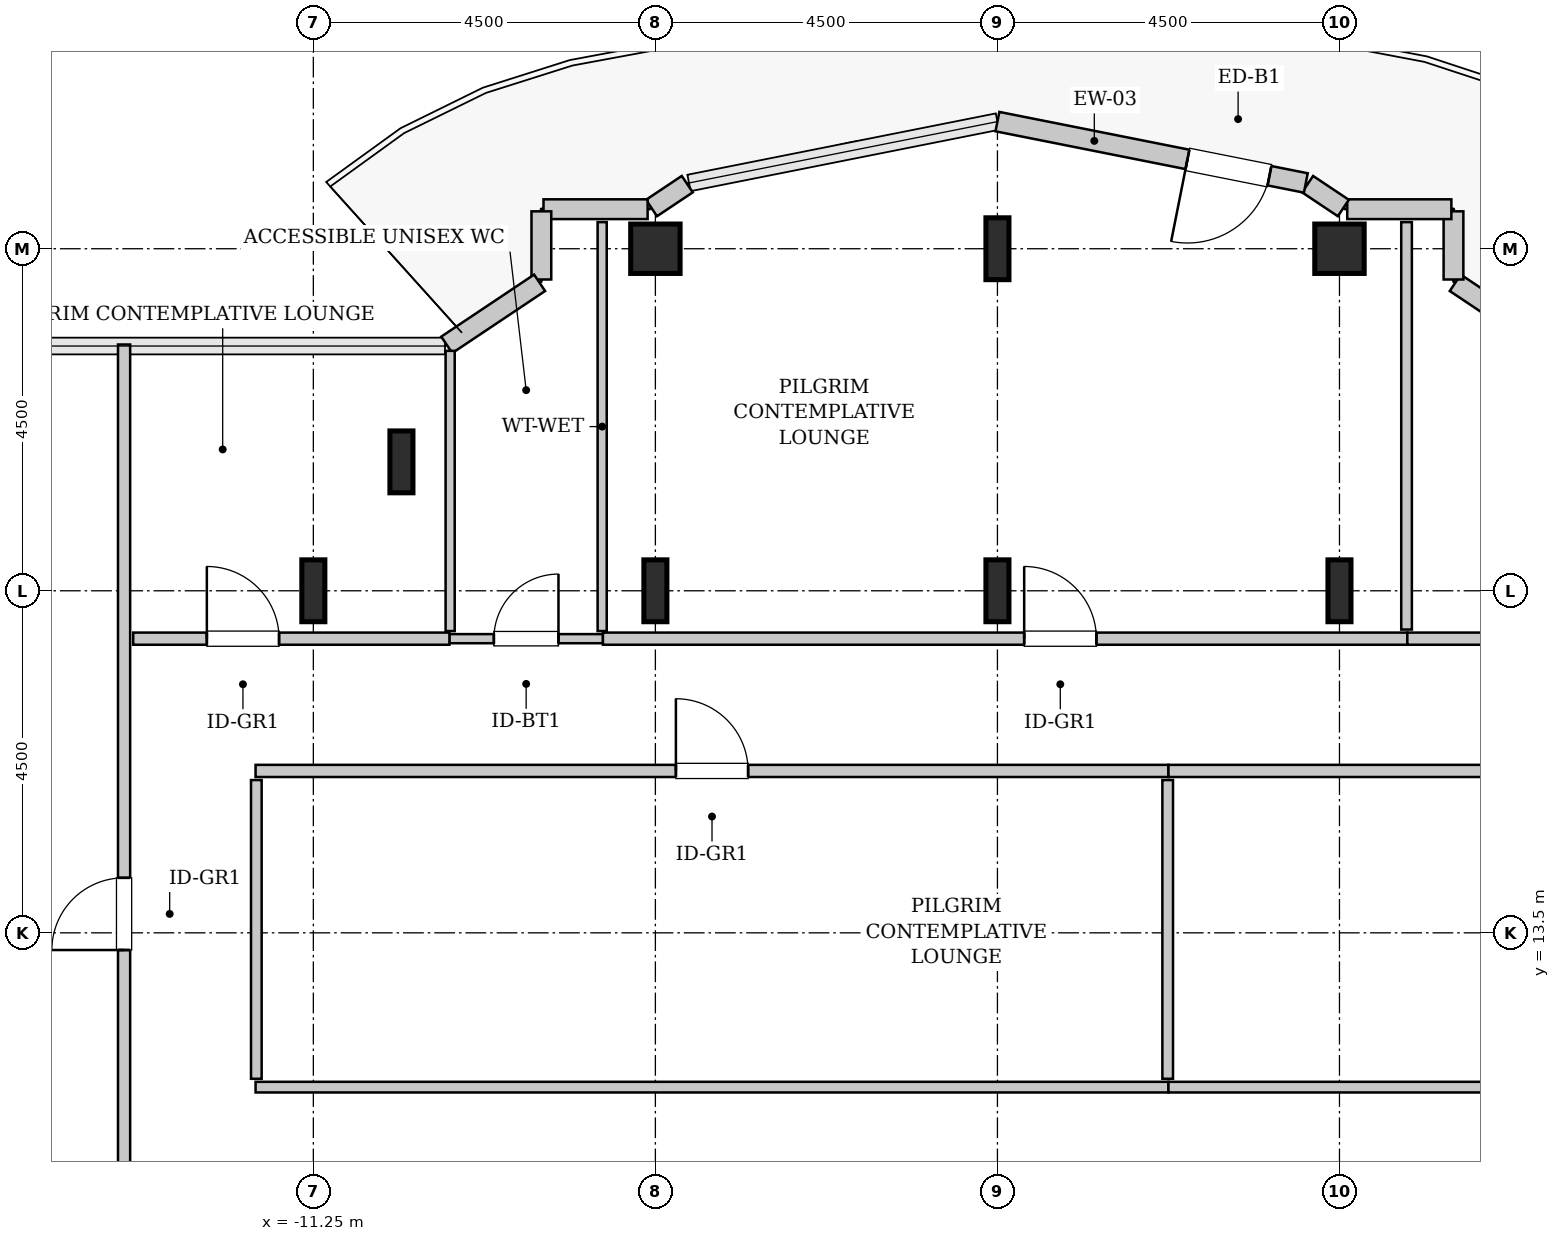
"""IFC4 building model, lengths in metres.
Left out: names, types, materials, properties, quantities, classifications, styles, units other than length and angle.
Written with IfcOpenShell. Run it as: python <this file> out.ifc"""

import sys

from ifc_helpers import new_model, si_unit, direction, frame, frame_2d, origin, origin_2d, place, context, subcontext, project, spatial, rectangle, hollow_rectangle, i_section, extrude, source, transform, mapped, element, fill, save


model = new_model("IFC4")
c1 = context("Model", 3, precision=1e-05, world=origin(), true_north=direction((0.0, 1.0)))
c2 = subcontext(c1, "Body", "Model", "MODEL_VIEW")
j1 = project(units=[si_unit("LENGTHUNIT", "METRE"), si_unit("PLANEANGLEUNIT", "RADIAN")], contexts=[c1])
p1 = place(None, origin())
s1 = spatial("IfcSite", under=j1, at=p1, CompositionType="ELEMENT")
p2 = place(p1, origin())
s2 = spatial("IfcBuilding", under=s1, at=p2, CompositionType="ELEMENT")
p3 = place(p2, frame((0.0, 0.0, 225.6)))
s3 = spatial("IfcBuildingStorey", under=s2, at=p3, CompositionType="ELEMENT", Elevation=225.6)
m1 = source(origin(), c2, "Body", "SweptSolid", [
    extrude(i_section(OverallWidth=0.303, OverallDepth=0.814, WebThickness=0.021, FlangeThickness=0.04, FilletRadius=0.03, at=origin_2d()), origin(), (0.0, 0.0, 1.0), 3.8),
])
for number, where, z_axis, x_axis in (
    (1, (-11.25, 18.0, 0.0), (0.0, 0.0, 1.0), (1.0, 0.0, 0.0)),
    (2, (-10.091, 19.696, 0.0), (0.0, 0.0, 1.0), (1.0, 0.0, 0.0)),
    (3, (-6.75, 18.0, 0.0), (0.0, 0.0, 1.0), (1.0, 0.0, 0.0)),
):
    element("IfcColumn", number, at=place(p3, frame(where, z_axis=z_axis, x_axis=x_axis)), inside=s3, PredefinedType="COLUMN", context=c2, shape_type="MappedRepresentation", body=[
        mapped(m1, transform((0.0, 0.0, 0.0), x_axis=(1.0, 0.0, 0.0), y_axis=(0.0, 1.0, 0.0), z_axis=(0.0, 0.0, 1.0), scale=1.0)),
    ])
m2 = source(origin(), c2, "Body", "SweptSolid", [
    extrude(hollow_rectangle(XDim=0.65, YDim=0.65, WallThickness=0.032, InnerFilletRadius=0.032, OuterFilletRadius=0.064, at=origin_2d()), origin(), (0.0, 0.0, 1.0), 3.8),
])
p4 = place(p3, frame((-6.75, 22.5, 0.0), z_axis=(0.0, 0.0, 1.0), x_axis=(1.0, 0.0, 0.0)))
e4 = element("IfcColumn", 4, at=p4, inside=s3, PredefinedType="COLUMN", context=c2, shape_type="MappedRepresentation", body=[
    mapped(m2, transform((0.0, 0.0, 0.0), x_axis=(1.0, 0.0, 0.0), y_axis=(0.0, 1.0, 0.0), z_axis=(0.0, 0.0, 1.0), scale=1.0)),
])
for number, where, z_axis, x_axis in (
    (5, (-2.25, 18.0, 0.0), (0.0, 0.0, 1.0), (1.0, 0.0, 0.0)),
    (6, (-2.25, 22.5, 0.0), (0.0, 0.0, 1.0), (1.0, 0.0, 0.0)),
    (7, (2.25, 18.0, 0.0), (0.0, 0.0, 1.0), (1.0, 0.0, 0.0)),
):
    element("IfcColumn", number, at=place(p3, frame(where, z_axis=z_axis, x_axis=x_axis)), inside=s3, PredefinedType="COLUMN", context=c2, shape_type="MappedRepresentation", body=[
        mapped(m1, transform((0.0, 0.0, 0.0), x_axis=(1.0, 0.0, 0.0), y_axis=(0.0, 1.0, 0.0), z_axis=(0.0, 0.0, 1.0), scale=1.0)),
    ])
p5 = place(p3, frame((2.25, 22.5, 0.0), z_axis=(0.0, 0.0, 1.0), x_axis=(1.0, 0.0, 0.0)))
e8 = element("IfcColumn", 8, at=p5, inside=s3, PredefinedType="COLUMN", context=c2, shape_type="MappedRepresentation", body=[
    mapped(m2, transform((0.0, 0.0, 0.0), x_axis=(1.0, 0.0, 0.0), y_axis=(0.0, 1.0, 0.0), z_axis=(0.0, 0.0, 1.0), scale=1.0)),
])
m3 = source(origin(), c2, "Body", "SweptSolid", [
    extrude(rectangle(XDim=1.469, YDim=0.26, at=frame_2d((0.734, 0.0))), origin(), (0.0, 0.0, 1.0), 3.55),
])
p6 = place(p3, frame((4.995, 21.236, 0.0), z_axis=(0.0, 0.0, 1.0), x_axis=(-0.831461760506, 0.555581983884, 0.0)))
e9 = element("IfcWall", 9, at=p6, inside=s3, PredefinedType="SOLIDWALL", context=c2, shape_type="MappedRepresentation", body=[
    mapped(m3, transform((0.0, 0.0, 0.0), x_axis=(1.0, 0.0, 0.0), y_axis=(0.0, 1.0, 0.0), z_axis=(0.0, 0.0, 1.0), scale=1.0)),
])
m4 = source(origin(), c2, "Body", "SweptSolid", [
    extrude(rectangle(XDim=0.897, YDim=0.26, at=frame_2d((0.448, 0.0))), origin(), (0.0, 0.0, 1.0), 3.55),
])
p7 = place(p3, frame((3.75, 22.095, 0.0), z_axis=(0.0, 0.0, 1.0), x_axis=(0.0, 1.0, 0.0)))
e10 = element("IfcWall", 10, at=p7, inside=s3, PredefinedType="SOLIDWALL", context=c2, shape_type="MappedRepresentation", body=[
    mapped(m4, transform((0.0, 0.0, 0.0), x_axis=(1.0, 0.0, 0.0), y_axis=(0.0, 1.0, 0.0), z_axis=(0.0, 0.0, 1.0), scale=1.0)),
])
m5 = source(origin(), c2, "Body", "SweptSolid", [
    extrude(rectangle(XDim=1.37, YDim=0.26, at=frame_2d((0.685, 0.0))), origin(), (0.0, 0.0, 1.0), 3.55),
])
p8 = place(p3, frame((3.722, 23.02, 0.0), z_axis=(0.0, 0.0, 1.0), x_axis=(-1.0, 0.0, 0.0)))
e11 = element("IfcWall", 11, at=p8, inside=s3, PredefinedType="SOLIDWALL", context=c2, shape_type="MappedRepresentation", body=[
    mapped(m5, transform((0.0, 0.0, 0.0), x_axis=(1.0, 0.0, 0.0), y_axis=(0.0, 1.0, 0.0), z_axis=(0.0, 0.0, 1.0), scale=1.0)),
])
m6 = source(origin(), c2, "Body", "SweptSolid", [
    extrude(rectangle(XDim=0.565, YDim=0.26, at=frame_2d((0.283, 0.0))), origin(), (0.0, 0.0, 1.0), 3.55),
])
p9 = place(p3, frame((2.301, 23.036, 0.0), z_axis=(0.0, 0.0, 1.0), x_axis=(-0.831651492666, 0.555297933317, 0.0)))
e12 = element("IfcWall", 12, at=p9, inside=s3, PredefinedType="SOLIDWALL", context=c2, shape_type="MappedRepresentation", body=[
    mapped(m6, transform((0.0, 0.0, 0.0), x_axis=(1.0, 0.0, 0.0), y_axis=(0.0, 1.0, 0.0), z_axis=(0.0, 0.0, 1.0), scale=1.0)),
])
m7 = source(origin(), c2, "Body", "SweptSolid", [
    extrude(rectangle(XDim=4.137, YDim=0.26, at=frame_2d((2.068, 0.0))), origin(), (0.0, 0.0, 1.0), 3.55),
])
p10 = place(p3, frame((1.807, 23.365, 0.0), z_axis=(0.0, 0.0, 1.0), x_axis=(-0.980782170794, 0.195105954428, 0.0)))
e13 = element("IfcWall", 13, at=p10, inside=s3, PredefinedType="SOLIDWALL", context=c2, shape_type="MappedRepresentation", body=[
    mapped(m7, transform((0.0, 0.0, 0.0), x_axis=(1.0, 0.0, 0.0), y_axis=(0.0, 1.0, 0.0), z_axis=(0.0, 0.0, 1.0), scale=1.0)),
])
p11 = place(p10, frame((0.488, 0.0, 0.0)))
e14 = element("IfcOpeningElement", 14, at=p11, cuts=e13, PredefinedType="OPENING", context=c2, shape_type="SweptSolid", body=[
    extrude(rectangle(XDim=1.1, YDim=2.2, at=frame_2d((0.55, 1.1))), frame((0.0, 0.14, 0.0), z_axis=(0.0, -1.0, 0.0), x_axis=(1.0, 0.0, 0.0)), (0.0, 0.0, 1.0), 0.28),
])
p12 = place(p3, frame((-6.331, 23.35, 0.0), z_axis=(0.0, 0.0, 1.0), x_axis=(-0.831651492666, -0.555297933317, 0.0)))
e15 = element("IfcWall", 15, at=p12, inside=s3, PredefinedType="SOLIDWALL", context=c2, shape_type="MappedRepresentation", body=[
    mapped(m6, transform((0.0, 0.0, 0.0), x_axis=(1.0, 0.0, 0.0), y_axis=(0.0, 1.0, 0.0), z_axis=(0.0, 0.0, 1.0), scale=1.0)),
])
p13 = place(p3, frame((-6.852, 23.02, 0.0), z_axis=(0.0, 0.0, 1.0), x_axis=(-1.0, 0.0, 0.0)))
e16 = element("IfcWall", 16, at=p13, inside=s3, PredefinedType="SOLIDWALL", context=c2, shape_type="MappedRepresentation", body=[
    mapped(m5, transform((0.0, 0.0, 0.0), x_axis=(1.0, 0.0, 0.0), y_axis=(0.0, 1.0, 0.0), z_axis=(0.0, 0.0, 1.0), scale=1.0)),
])
p14 = place(p3, frame((-8.25, 22.992, 0.0), z_axis=(0.0, 0.0, 1.0), x_axis=(0.0, -1.0, 0.0)))
e17 = element("IfcWall", 17, at=p14, inside=s3, PredefinedType="SOLIDWALL", context=c2, shape_type="MappedRepresentation", body=[
    mapped(m4, transform((0.0, 0.0, 0.0), x_axis=(1.0, 0.0, 0.0), y_axis=(0.0, 1.0, 0.0), z_axis=(0.0, 0.0, 1.0), scale=1.0)),
])
p15 = place(p3, frame((-8.273, 22.052, 0.0), z_axis=(0.0, 0.0, 1.0), x_axis=(-0.831461760506, -0.555581983884, 0.0)))
e18 = element("IfcWall", 18, at=p15, inside=s3, PredefinedType="SOLIDWALL", context=c2, shape_type="MappedRepresentation", body=[
    mapped(m3, transform((0.0, 0.0, 0.0), x_axis=(1.0, 0.0, 0.0), y_axis=(0.0, 1.0, 0.0), z_axis=(0.0, 0.0, 1.0), scale=1.0)),
])
m8 = source(origin(), c2, "Body", "SweptSolid", [
    extrude(rectangle(XDim=2.02, YDim=0.12, at=frame_2d((1.01, 0.0))), origin(), (0.0, 0.0, 1.0), 3.535),
])
p16 = place(p3, frame((-9.46, 17.37, 0.0), z_axis=(0.0, 0.0, 1.0), x_axis=(1.0, 0.0, 0.0)))
e19 = element("IfcWall", 19, at=p16, inside=s3, PredefinedType="PLUMBINGWALL", context=c2, shape_type="MappedRepresentation", body=[
    mapped(m8, transform((0.0, 0.0, 0.0), x_axis=(1.0, 0.0, 0.0), y_axis=(0.0, 1.0, 0.0), z_axis=(0.0, 0.0, 1.0), scale=1.0)),
])
p17 = place(p16, frame((0.585, 0.0, 0.0)))
e20 = element("IfcOpeningElement", 20, at=p17, cuts=e19, PredefinedType="OPENING", context=c2, shape_type="SweptSolid", body=[
    extrude(rectangle(XDim=0.85, YDim=2.1, at=frame_2d((0.425, 1.05))), frame((0.0, 0.07, 0.0), z_axis=(0.0, -1.0, 0.0), x_axis=(1.0, 0.0, 0.0)), (0.0, 0.0, 1.0), 0.14),
])
m9 = source(origin(), c2, "Body", "SweptSolid", [
    extrude(rectangle(XDim=5.38, YDim=0.12, at=frame_2d((2.69, 0.0))), origin(), (0.0, 0.0, 1.0), 3.535),
])
p18 = place(p3, frame((-7.45, 17.47, 0.0), z_axis=(0.0, 0.0, 1.0), x_axis=(0.0, 1.0, 0.0)))
e21 = element("IfcWall", 21, at=p18, inside=s3, PredefinedType="PLUMBINGWALL", context=c2, shape_type="MappedRepresentation", body=[
    mapped(m9, transform((0.0, 0.0, 0.0), x_axis=(1.0, 0.0, 0.0), y_axis=(0.0, 1.0, 0.0), z_axis=(0.0, 0.0, 1.0), scale=1.0)),
])
m10 = source(origin(), c2, "Body", "SweptSolid", [
    extrude(rectangle(XDim=3.687, YDim=0.12, at=frame_2d((1.843, 0.0))), origin(), (0.0, 0.0, 1.0), 3.535),
])
p19 = place(p3, frame((-9.45, 17.47, 0.0), z_axis=(0.0, 0.0, 1.0), x_axis=(0.0, 1.0, 0.0)))
e22 = element("IfcWall", 22, at=p19, inside=s3, PredefinedType="PLUMBINGWALL", context=c2, shape_type="MappedRepresentation", body=[
    mapped(m10, transform((0.0, 0.0, 0.0), x_axis=(1.0, 0.0, 0.0), y_axis=(0.0, 1.0, 0.0), z_axis=(0.0, 0.0, 1.0), scale=1.0)),
])
m11 = source(origin(), c2, "Body", "SweptSolid", [
    extrude(rectangle(XDim=11.153, YDim=0.16, at=frame_2d((5.576, 0.0))), origin(), (0.0, 0.0, 1.0), 3.535),
])
p20 = place(p3, frame((-13.74, 10.087, 0.0), z_axis=(0.0, 0.0, 1.0), x_axis=(0.0, 1.0, 0.0)))
e23 = element("IfcWall", 23, at=p20, inside=s3, PredefinedType="PARTITIONING", context=c2, shape_type="MappedRepresentation", body=[
    mapped(m11, transform((0.0, 0.0, 0.0), x_axis=(1.0, 0.0, 0.0), y_axis=(0.0, 1.0, 0.0), z_axis=(0.0, 0.0, 1.0), scale=1.0)),
])
p21 = place(p20, frame((3.186, 0.0, 0.0)))
e24 = element("IfcOpeningElement", 24, at=p21, cuts=e23, PredefinedType="OPENING", context=c2, shape_type="SweptSolid", body=[
    extrude(rectangle(XDim=0.95, YDim=2.1, at=frame_2d((0.475, 1.05))), frame((0.0, 0.09, 0.0), z_axis=(0.0, -1.0, 0.0), x_axis=(1.0, 0.0, 0.0)), (0.0, 0.0, 1.0), 0.18),
])
m12 = source(origin(), c2, "Body", "SweptSolid", [
    extrude(rectangle(XDim=10.583, YDim=0.16, at=frame_2d((5.291, 0.0))), origin(), (0.0, 0.0, 1.0), 3.535),
])
p22 = place(p3, frame((-7.44, 17.37, 0.0), z_axis=(0.0, 0.0, 1.0), x_axis=(1.0, 0.0, 0.0)))
e25 = element("IfcWall", 25, at=p22, inside=s3, PredefinedType="PARTITIONING", context=c2, shape_type="MappedRepresentation", body=[
    mapped(m12, transform((0.0, 0.0, 0.0), x_axis=(1.0, 0.0, 0.0), y_axis=(0.0, 1.0, 0.0), z_axis=(0.0, 0.0, 1.0), scale=1.0)),
])
p23 = place(p22, frame((5.542, 0.0, 0.0)))
e26 = element("IfcOpeningElement", 26, at=p23, cuts=e25, PredefinedType="OPENING", context=c2, shape_type="SweptSolid", body=[
    extrude(rectangle(XDim=0.95, YDim=2.1, at=frame_2d((0.475, 1.05))), frame((0.0, 0.09, 0.0), z_axis=(0.0, -1.0, 0.0), x_axis=(1.0, 0.0, 0.0)), (0.0, 0.0, 1.0), 0.18),
])
m13 = source(origin(), c2, "Body", "SweptSolid", [
    extrude(rectangle(XDim=5.36, YDim=0.14, at=frame_2d((2.68, 0.0))), origin(), (0.0, 0.0, 1.0), 3.535),
])
p24 = place(p3, frame((3.133, 17.49, 0.0), z_axis=(0.0, 0.0, 1.0), x_axis=(0.0, 1.0, 0.0)))
e27 = element("IfcWall", 27, at=p24, inside=s3, PredefinedType="PARTITIONING", context=c2, shape_type="MappedRepresentation", body=[
    mapped(m13, transform((0.0, 0.0, 0.0), x_axis=(1.0, 0.0, 0.0), y_axis=(0.0, 1.0, 0.0), z_axis=(0.0, 0.0, 1.0), scale=1.0)),
])
m14 = source(origin(), c2, "Body", "SweptSolid", [
    extrude(rectangle(XDim=10.478, YDim=0.16, at=frame_2d((5.239, 0.0))), origin(), (0.0, 0.0, 1.0), 3.535),
])
p25 = place(p3, frame((3.143, 17.37, 0.0), z_axis=(0.0, 0.0, 1.0), x_axis=(1.0, 0.0, 0.0)))
e28 = element("IfcWall", 28, at=p25, inside=s3, PredefinedType="PARTITIONING", context=c2, shape_type="MappedRepresentation", body=[
    mapped(m14, transform((0.0, 0.0, 0.0), x_axis=(1.0, 0.0, 0.0), y_axis=(0.0, 1.0, 0.0), z_axis=(0.0, 0.0, 1.0), scale=1.0)),
])
p26 = place(p25, frame((4.764, 0.0, 0.0)))
e29 = element("IfcOpeningElement", 29, at=p26, cuts=e28, PredefinedType="OPENING", context=c2, shape_type="SweptSolid", body=[
    extrude(rectangle(XDim=0.95, YDim=2.1, at=frame_2d((0.475, 1.05))), frame((0.0, 0.09, 0.0), z_axis=(0.0, -1.0, 0.0), x_axis=(1.0, 0.0, 0.0)), (0.0, 0.0, 1.0), 0.18),
])
m15 = source(origin(), c2, "Body", "SweptSolid", [
    extrude(rectangle(XDim=12.01, YDim=0.16, at=frame_2d((6.005, 0.0))), origin(), (0.0, 0.0, 1.0), 3.535),
])
p27 = place(p3, frame((-12.01, 15.63, 0.0), z_axis=(0.0, 0.0, 1.0), x_axis=(1.0, 0.0, 0.0)))
e30 = element("IfcWall", 30, at=p27, inside=s3, PredefinedType="PARTITIONING", context=c2, shape_type="MappedRepresentation", body=[
    mapped(m15, transform((0.0, 0.0, 0.0), x_axis=(1.0, 0.0, 0.0), y_axis=(0.0, 1.0, 0.0), z_axis=(0.0, 0.0, 1.0), scale=1.0)),
])
p28 = place(p27, frame((5.53, 0.0, 0.0)))
e31 = element("IfcOpeningElement", 31, at=p28, cuts=e30, PredefinedType="OPENING", context=c2, shape_type="SweptSolid", body=[
    extrude(rectangle(XDim=0.95, YDim=2.1, at=frame_2d((0.475, 1.05))), frame((0.0, 0.09, 0.0), z_axis=(0.0, -1.0, 0.0), x_axis=(1.0, 0.0, 0.0)), (0.0, 0.0, 1.0), 0.18),
])
m16 = source(origin(), c2, "Body", "SweptSolid", [
    extrude(rectangle(XDim=12.01, YDim=0.14, at=frame_2d((6.005, 0.0))), origin(), (0.0, 0.0, 1.0), 3.535),
])
p29 = place(p3, frame((-12.01, 11.47, 0.0), z_axis=(0.0, 0.0, 1.0), x_axis=(1.0, 0.0, 0.0)))
e32 = element("IfcWall", 32, at=p29, inside=s3, PredefinedType="PARTITIONING", context=c2, shape_type="MappedRepresentation", body=[
    mapped(m16, transform((0.0, 0.0, 0.0), x_axis=(1.0, 0.0, 0.0), y_axis=(0.0, 1.0, 0.0), z_axis=(0.0, 0.0, 1.0), scale=1.0)),
])
m17 = source(origin(), c2, "Body", "SweptSolid", [
    extrude(rectangle(XDim=3.93, YDim=0.14, at=frame_2d((1.965, 0.0))), origin(), (0.0, 0.0, 1.0), 3.535),
])
for number, where, z_axis, x_axis in (
    (33, (-12.0, 11.58, 0.0), (0.0, 0.0, 1.0), (0.0, 1.0, 0.0)),
    (34, (-0.01, 11.58, 0.0), (0.0, 0.0, 1.0), (0.0, 1.0, 0.0)),
):
    element("IfcWall", number, at=place(p3, frame(where, z_axis=z_axis, x_axis=x_axis)), inside=s3, PredefinedType="PARTITIONING", context=c2, shape_type="MappedRepresentation", body=[
        mapped(m17, transform((0.0, 0.0, 0.0), x_axis=(1.0, 0.0, 0.0), y_axis=(0.0, 1.0, 0.0), z_axis=(0.0, 0.0, 1.0), scale=1.0)),
    ])
p30 = place(p3, frame((0.0, 15.63, 0.0), z_axis=(0.0, 0.0, 1.0), x_axis=(1.0, 0.0, 0.0)))
e35 = element("IfcWall", 35, at=p30, inside=s3, PredefinedType="PARTITIONING", context=c2, shape_type="MappedRepresentation", body=[
    mapped(m15, transform((0.0, 0.0, 0.0), x_axis=(1.0, 0.0, 0.0), y_axis=(0.0, 1.0, 0.0), z_axis=(0.0, 0.0, 1.0), scale=1.0)),
])
p31 = place(p30, frame((5.53, 0.0, 0.0)))
e36 = element("IfcOpeningElement", 36, at=p31, cuts=e35, PredefinedType="OPENING", context=c2, shape_type="SweptSolid", body=[
    extrude(rectangle(XDim=0.95, YDim=2.1, at=frame_2d((0.475, 1.05))), frame((0.0, 0.09, 0.0), z_axis=(0.0, -1.0, 0.0), x_axis=(1.0, 0.0, 0.0)), (0.0, 0.0, 1.0), 0.18),
])
p32 = place(p3, frame((0.0, 11.47, 0.0), z_axis=(0.0, 0.0, 1.0), x_axis=(1.0, 0.0, 0.0)))
e37 = element("IfcWall", 37, at=p32, inside=s3, PredefinedType="PARTITIONING", context=c2, shape_type="MappedRepresentation", body=[
    mapped(m16, transform((0.0, 0.0, 0.0), x_axis=(1.0, 0.0, 0.0), y_axis=(0.0, 1.0, 0.0), z_axis=(0.0, 0.0, 1.0), scale=1.0)),
])
m18 = source(origin(), c2, "Body", "SweptSolid", [
    extrude(rectangle(XDim=4.16, YDim=0.16, at=frame_2d((2.08, 0.0))), origin(), (0.0, 0.0, 1.0), 3.535),
])
p33 = place(p3, frame((-13.62, 17.37, 0.0), z_axis=(0.0, 0.0, 1.0), x_axis=(1.0, 0.0, 0.0)))
e38 = element("IfcWall", 38, at=p33, inside=s3, PredefinedType="PARTITIONING", context=c2, shape_type="MappedRepresentation", body=[
    mapped(m18, transform((0.0, 0.0, 0.0), x_axis=(1.0, 0.0, 0.0), y_axis=(0.0, 1.0, 0.0), z_axis=(0.0, 0.0, 1.0), scale=1.0)),
])
p34 = place(p33, frame((0.969, 0.0, 0.0)))
e39 = element("IfcOpeningElement", 39, at=p34, cuts=e38, PredefinedType="OPENING", context=c2, shape_type="SweptSolid", body=[
    extrude(rectangle(XDim=0.95, YDim=2.1, at=frame_2d((0.475, 1.05))), frame((0.0, 0.09, 0.0), z_axis=(0.0, -1.0, 0.0), x_axis=(1.0, 0.0, 0.0)), (0.0, 0.0, 1.0), 0.18),
])
m19 = source(origin(), c2, "Body", "SweptSolid", [
    extrude(rectangle(XDim=1.1, YDim=2.2, at=frame_2d((0.55, 1.1))), frame((0.0, 0.025, 0.0), z_axis=(0.0, -1.0, 0.0), x_axis=(1.0, 0.0, 0.0)), (0.0, 0.0, 1.0), 0.05),
])
p35 = place(p11, origin())
e40 = element("IfcDoor", 40, at=p35, inside=s3, OperationType="SINGLE_SWING_RIGHT", PredefinedType="DOOR", context=c2, shape_type="MappedRepresentation", body=[
    mapped(m19, transform((0.0, 0.0, 0.0), x_axis=(1.0, 0.0, 0.0), y_axis=(0.0, 1.0, 0.0), z_axis=(0.0, 0.0, 1.0), scale=1.0)),
])
fill(e14, e40)
m20 = source(origin(), c2, "Body", "SweptSolid", [
    extrude(rectangle(XDim=0.85, YDim=2.1, at=frame_2d((0.425, 1.05))), frame((0.0, 0.025, 0.0), z_axis=(0.0, -1.0, 0.0), x_axis=(1.0, 0.0, 0.0)), (0.0, 0.0, 1.0), 0.05),
])
p36 = place(p17, origin())
e41 = element("IfcDoor", 41, at=p36, inside=s3, OperationType="SINGLE_SWING_RIGHT", PredefinedType="DOOR", context=c2, shape_type="MappedRepresentation", body=[
    mapped(m20, transform((0.0, 0.0, 0.0), x_axis=(1.0, 0.0, 0.0), y_axis=(0.0, 1.0, 0.0), z_axis=(0.0, 0.0, 1.0), scale=1.0)),
])
fill(e20, e41)
m21 = source(origin(), c2, "Body", "SweptSolid", [
    extrude(rectangle(XDim=0.95, YDim=2.1, at=frame_2d((0.475, 1.05))), frame((0.0, 0.025, 0.0), z_axis=(0.0, -1.0, 0.0), x_axis=(1.0, 0.0, 0.0)), (0.0, 0.0, 1.0), 0.05),
])
p37 = place(p21, origin())
e42 = element("IfcDoor", 42, at=p37, inside=s3, OperationType="SINGLE_SWING_LEFT", PredefinedType="DOOR", context=c2, shape_type="MappedRepresentation", body=[
    mapped(m21, transform((0.0, 0.0, 0.0), x_axis=(1.0, 0.0, 0.0), y_axis=(0.0, 1.0, 0.0), z_axis=(0.0, 0.0, 1.0), scale=1.0)),
])
fill(e24, e42)
p38 = place(p23, origin())
e43 = element("IfcDoor", 43, at=p38, inside=s3, OperationType="SINGLE_SWING_LEFT", PredefinedType="DOOR", context=c2, shape_type="MappedRepresentation", body=[
    mapped(m21, transform((0.0, 0.0, 0.0), x_axis=(1.0, 0.0, 0.0), y_axis=(0.0, 1.0, 0.0), z_axis=(0.0, 0.0, 1.0), scale=1.0)),
])
fill(e26, e43)
p39 = place(p28, origin())
e44 = element("IfcDoor", 44, at=p39, inside=s3, OperationType="SINGLE_SWING_LEFT", PredefinedType="DOOR", context=c2, shape_type="MappedRepresentation", body=[
    mapped(m21, transform((0.0, 0.0, 0.0), x_axis=(1.0, 0.0, 0.0), y_axis=(0.0, 1.0, 0.0), z_axis=(0.0, 0.0, 1.0), scale=1.0)),
])
fill(e31, e44)
p40 = place(p34, origin())
e45 = element("IfcDoor", 45, at=p40, inside=s3, OperationType="SINGLE_SWING_LEFT", PredefinedType="DOOR", context=c2, shape_type="MappedRepresentation", body=[
    mapped(m21, transform((0.0, 0.0, 0.0), x_axis=(1.0, 0.0, 0.0), y_axis=(0.0, 1.0, 0.0), z_axis=(0.0, 0.0, 1.0), scale=1.0)),
])
fill(e39, e45)
save(model, sys.argv[1])
